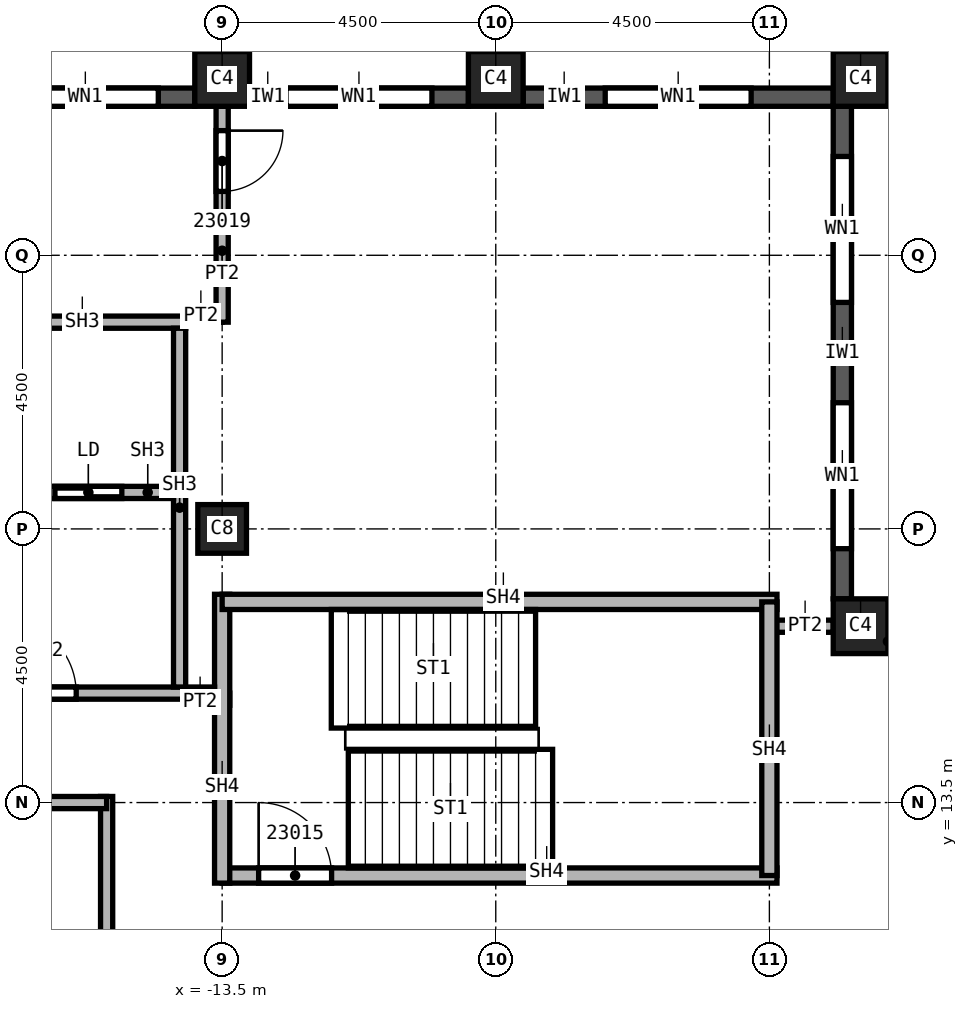
"""IFC4 building model, lengths in metres.
Left out: names, types, materials, properties, quantities, classifications, styles, units other than length and angle.
Written with IfcOpenShell. Run it as: python <this file> out.ifc"""

import sys

from ifc_helpers import new_model, si_unit, direction, frame, frame_2d, origin, origin_2d, place, context, subcontext, project, spatial, rectangle, extrude, element, fill, save


model = new_model("IFC4")
c1 = context("Model", 3, precision=1e-05, world=origin(), true_north=direction((0.0, 1.0)))
c2 = subcontext(c1, "Body", "Model", "MODEL_VIEW")
j1 = project(units=[si_unit("LENGTHUNIT", "METRE"), si_unit("PLANEANGLEUNIT", "RADIAN")], contexts=[c1])
p1 = place(None, origin())
s1 = spatial("IfcSite", under=j1, at=p1, CompositionType="ELEMENT")
p2 = place(p1, origin())
s2 = spatial("IfcBuilding", under=s1, at=p2, CompositionType="ELEMENT")
p3 = place(p2, frame((0.0, 0.0, 330.0)))
s3 = spatial("IfcBuildingStorey", under=s2, at=p3, CompositionType="ELEMENT", Elevation=330.0)
p4 = place(p3, frame((-13.5, 18.0, 0.0), z_axis=(0.0, 0.0, 1.0), x_axis=(1.0, 0.0, 0.0)))
e1 = element("IfcColumn", 1, at=p4, inside=s3, PredefinedType="COLUMN", context=c2, shape_type="SweptSolid", body=[
    extrude(rectangle(XDim=0.8, YDim=0.8, at=origin_2d()), origin(), (0.0, 0.0, 1.0), 3.74),
])
for number, where, z_axis, x_axis in (
    (2, (-3.0, 25.4, 0.0), (0.0, 0.0, 1.0), (1.0, 0.0, 0.0)),
    (3, (-9.0, 25.4, 0.0), (0.0, 0.0, 1.0), (1.0, 0.0, 0.0)),
    (4, (-13.5, 25.4, 0.0), (0.0, 0.0, 1.0), (1.0, 0.0, 0.0)),
    (5, (-3.0, 16.4, 0.0), (0.0, 0.0, 1.0), (1.0, 0.0, 0.0)),
):
    element("IfcColumn", number, at=place(p3, frame(where, z_axis=z_axis, x_axis=x_axis)), inside=s3, PredefinedType="COLUMN", context=c2, shape_type="SweptSolid", body=[
        extrude(rectangle(XDim=0.9, YDim=0.9, at=origin_2d()), origin(), (0.0, 0.0, 1.0), 3.74),
    ])
p5 = place(p3, frame((-3.3, 16.85, 0.0), z_axis=(0.0, 0.0, 1.0), x_axis=(0.0, 1.0, 0.0)))
e6 = element("IfcWall", 6, at=p5, inside=s3, PredefinedType="SOLIDWALL", context=c2, shape_type="SweptSolid", body=[
    extrude(rectangle(XDim=8.1, YDim=0.3, at=frame_2d((4.05, 0.0))), origin(), (0.0, 0.0, 1.0), 3.14),
])
p6 = place(p5, frame((0.825, 0.0, 0.8)))
e7 = element("IfcOpeningElement", 7, at=p6, cuts=e6, PredefinedType="OPENING", context=c2, shape_type="SweptSolid", body=[
    extrude(rectangle(XDim=2.4, YDim=1.95, at=frame_2d((1.2, 0.975))), frame((0.0, 0.15, 0.0), z_axis=(0.0, -1.0, 0.0), x_axis=(1.0, 0.0, 0.0)), (0.0, 0.0, 1.0), 0.3),
])
p7 = place(p5, frame((4.875, 0.0, 0.8)))
e8 = element("IfcOpeningElement", 8, at=p7, cuts=e6, PredefinedType="OPENING", context=c2, shape_type="SweptSolid", body=[
    extrude(rectangle(XDim=2.4, YDim=1.95, at=frame_2d((1.2, 0.975))), frame((0.0, 0.15, 0.0), z_axis=(0.0, -1.0, 0.0), x_axis=(1.0, 0.0, 0.0)), (0.0, 0.0, 1.0), 0.3),
])
p8 = place(p3, frame((-3.45, 25.1, 0.0), z_axis=(0.0, 0.0, 1.0), x_axis=(-1.0, 0.0, 0.0)))
e9 = element("IfcWall", 9, at=p8, inside=s3, PredefinedType="SOLIDWALL", context=c2, shape_type="SweptSolid", body=[
    extrude(rectangle(XDim=5.1, YDim=0.3, at=frame_2d((2.55, 0.0))), origin(), (0.0, 0.0, 1.0), 3.14),
])
p9 = place(p8, frame((1.35, 0.0, 0.8)))
e10 = element("IfcOpeningElement", 10, at=p9, cuts=e9, PredefinedType="OPENING", context=c2, shape_type="SweptSolid", body=[
    extrude(rectangle(XDim=2.4, YDim=1.95, at=frame_2d((1.2, 0.975))), frame((0.0, 0.15, 0.0), z_axis=(0.0, -1.0, 0.0), x_axis=(1.0, 0.0, 0.0)), (0.0, 0.0, 1.0), 0.3),
])
p10 = place(p3, frame((-9.45, 25.1, 0.0), z_axis=(0.0, 0.0, 1.0), x_axis=(-1.0, 0.0, 0.0)))
e11 = element("IfcWall", 11, at=p10, inside=s3, PredefinedType="SOLIDWALL", context=c2, shape_type="SweptSolid", body=[
    extrude(rectangle(XDim=3.6, YDim=0.3, at=frame_2d((1.8, 0.0))), origin(), (0.0, 0.0, 1.0), 3.14),
])
p11 = place(p10, frame((0.6, 0.0, 0.8)))
e12 = element("IfcOpeningElement", 12, at=p11, cuts=e11, PredefinedType="OPENING", context=c2, shape_type="SweptSolid", body=[
    extrude(rectangle(XDim=2.4, YDim=1.95, at=frame_2d((1.2, 0.975))), frame((0.0, 0.15, 0.0), z_axis=(0.0, -1.0, 0.0), x_axis=(1.0, 0.0, 0.0)), (0.0, 0.0, 1.0), 0.3),
])
p12 = place(p3, frame((-13.95, 25.1, 0.0), z_axis=(0.0, 0.0, 1.0), x_axis=(-1.0, 0.0, 0.0)))
e13 = element("IfcWall", 13, at=p12, inside=s3, PredefinedType="SOLIDWALL", context=c2, shape_type="SweptSolid", body=[
    extrude(rectangle(XDim=3.6, YDim=0.3, at=frame_2d((1.8, 0.0))), origin(), (0.0, 0.0, 1.0), 3.14),
])
p13 = place(p12, frame((0.6, 0.0, 0.8)))
e14 = element("IfcOpeningElement", 14, at=p13, cuts=e13, PredefinedType="OPENING", context=c2, shape_type="SweptSolid", body=[
    extrude(rectangle(XDim=2.4, YDim=1.95, at=frame_2d((1.2, 0.975))), frame((0.0, 0.15, 0.0), z_axis=(0.0, -1.0, 0.0), x_axis=(1.0, 0.0, 0.0)), (0.0, 0.0, 1.0), 0.3),
])
p14 = place(p3, frame((-15.4, -24.95, 0.0), z_axis=(0.0, 0.0, 1.0), x_axis=(0.0, 1.0, 0.0)))
e15 = element("IfcWall", 15, at=p14, inside=s3, PredefinedType="PARTITIONING", context=c2, shape_type="SweptSolid", body=[
    extrude(rectangle(XDim=38.55, YDim=0.2, at=frame_2d((19.275, 0.0))), origin(), (0.0, 0.0, 1.0), 3.74),
])
p15 = place(p14, frame((30.8, 0.0, 0.0)))
e16 = element("IfcOpeningElement", 16, at=p15, cuts=e15, PredefinedType="OPENING", context=c2, shape_type="SweptSolid", body=[
    extrude(rectangle(XDim=1.0, YDim=2.1, at=frame_2d((0.5, 1.05))), frame((0.0, 0.1, 0.0), z_axis=(0.0, -1.0, 0.0), x_axis=(1.0, 0.0, 0.0)), (0.0, 0.0, 1.0), 0.2),
])
p16 = place(p14, frame((3.1, 0.0, 0.0)))
e17 = element("IfcOpeningElement", 17, at=p16, cuts=e15, PredefinedType="OPENING", context=c2, shape_type="SweptSolid", body=[
    extrude(rectangle(XDim=1.0, YDim=2.1, at=frame_2d((0.5, 1.05))), frame((0.0, 0.1, 0.0), z_axis=(0.0, -1.0, 0.0), x_axis=(1.0, 0.0, 0.0)), (0.0, 0.0, 1.0), 0.2),
])
p17 = place(p14, frame((10.1, 0.0, 0.0)))
e18 = element("IfcOpeningElement", 18, at=p17, cuts=e15, PredefinedType="OPENING", context=c2, shape_type="SweptSolid", body=[
    extrude(rectangle(XDim=1.0, YDim=2.1, at=frame_2d((0.5, 1.05))), frame((0.0, 0.1, 0.0), z_axis=(0.0, -1.0, 0.0), x_axis=(1.0, 0.0, 0.0)), (0.0, 0.0, 1.0), 0.2),
])
p18 = place(p14, frame((18.2, 0.0, 0.0)))
e19 = element("IfcOpeningElement", 19, at=p18, cuts=e15, PredefinedType="OPENING", context=c2, shape_type="SweptSolid", body=[
    extrude(rectangle(XDim=1.0, YDim=2.1, at=frame_2d((0.5, 1.05))), frame((0.0, 0.1, 0.0), z_axis=(0.0, -1.0, 0.0), x_axis=(1.0, 0.0, 0.0)), (0.0, 0.0, 1.0), 0.2),
])
p19 = place(p3, frame((-15.4, 13.5, 0.0), z_axis=(0.0, 0.0, 1.0), x_axis=(-1.0, 0.0, 0.0)))
e20 = element("IfcWall", 20, at=p19, inside=s3, PredefinedType="PARTITIONING", context=c2, shape_type="SweptSolid", body=[
    extrude(rectangle(XDim=6.6, YDim=0.2, at=frame_2d((3.3, 0.0))), origin(), (0.0, 0.0, 1.0), 3.74),
])
p20 = place(p19, frame((3.7, 0.0, 0.0)))
e21 = element("IfcOpeningElement", 21, at=p20, cuts=e20, PredefinedType="OPENING", context=c2, shape_type="SweptSolid", body=[
    extrude(rectangle(XDim=1.0, YDim=2.1, at=frame_2d((0.5, 1.05))), frame((0.0, 0.1, 0.0), z_axis=(0.0, -1.0, 0.0), x_axis=(1.0, 0.0, 0.0)), (0.0, 0.0, 1.0), 0.2),
])
p21 = place(p3, frame((-14.1, 15.2, 0.0), z_axis=(0.0, 0.0, 1.0), x_axis=(1.0, 0.0, 0.0)))
e22 = element("IfcWall", 22, at=p21, inside=s3, PredefinedType="PARTITIONING", context=c2, shape_type="SweptSolid", body=[
    extrude(rectangle(XDim=0.725, YDim=0.2, at=frame_2d((0.363, 0.0))), origin(), (0.0, 0.0, 1.0), 3.74),
])
p22 = place(p3, frame((-13.5, 21.5, 0.0), z_axis=(0.0, 0.0, 1.0), x_axis=(-1.0, 0.0, 0.0)))
e23 = element("IfcWall", 23, at=p22, inside=s3, PredefinedType="PARTITIONING", context=c2, shape_type="SweptSolid", body=[
    extrude(rectangle(XDim=0.6, YDim=0.2, at=frame_2d((0.3, 0.0))), origin(), (0.0, 0.0, 1.0), 3.74),
])
p23 = place(p3, frame((-13.5, 24.95, 0.0), z_axis=(0.0, 0.0, 1.0), x_axis=(0.0, -1.0, 0.0)))
e24 = element("IfcWall", 24, at=p23, inside=s3, PredefinedType="PARTITIONING", context=c2, shape_type="SweptSolid", body=[
    extrude(rectangle(XDim=3.55, YDim=0.2, at=frame_2d((1.775, 0.0))), origin(), (0.0, 0.0, 1.0), 3.74),
])
p24 = place(p23, frame((0.4, 0.0, 0.0)))
e25 = element("IfcOpeningElement", 25, at=p24, cuts=e24, PredefinedType="OPENING", context=c2, shape_type="SweptSolid", body=[
    extrude(rectangle(XDim=1.0, YDim=2.1, at=frame_2d((0.5, 1.05))), frame((0.0, 0.1, 0.0), z_axis=(0.0, -1.0, 0.0), x_axis=(1.0, 0.0, 0.0)), (0.0, 0.0, 1.0), 0.2),
])
p25 = place(p3, frame((-4.5, 16.4, 0.0), z_axis=(0.0, 0.0, 1.0), x_axis=(1.0, 0.0, 0.0)))
e26 = element("IfcWall", 26, at=p25, inside=s3, PredefinedType="PARTITIONING", context=c2, shape_type="SweptSolid", body=[
    extrude(rectangle(XDim=1.05, YDim=0.2, at=frame_2d((0.525, 0.0))), origin(), (0.0, 0.0, 1.0), 3.74),
])
p26 = place(p3, frame((-13.5, 12.3, 0.0), z_axis=(0.0, 0.0, 1.0), x_axis=(1.0, 0.0, 0.0)))
e27 = element("IfcWall", 27, at=p26, inside=s3, PredefinedType="SOLIDWALL", context=c2, shape_type="SweptSolid", body=[
    extrude(rectangle(XDim=9.125, YDim=0.25, at=frame_2d((4.562, 0.0))), origin(), (0.0, 0.0, 1.0), 3.74),
])
p27 = place(p26, frame((0.6, 0.0, 0.0)))
e28 = element("IfcOpeningElement", 28, at=p27, cuts=e27, PredefinedType="OPENING", context=c2, shape_type="SweptSolid", body=[
    extrude(rectangle(XDim=1.2, YDim=2.1, at=frame_2d((0.6, 1.05))), frame((0.0, 0.125, 0.0), z_axis=(0.0, -1.0, 0.0), x_axis=(1.0, 0.0, 0.0)), (0.0, 0.0, 1.0), 0.25),
])
p28 = place(p3, frame((-13.5, 12.175, 0.0), z_axis=(0.0, 0.0, 1.0), x_axis=(0.0, 1.0, 0.0)))
e29 = element("IfcWall", 29, at=p28, inside=s3, PredefinedType="SOLIDWALL", context=c2, shape_type="SweptSolid", body=[
    extrude(rectangle(XDim=4.75, YDim=0.25, at=frame_2d((2.375, 0.0))), origin(), (0.0, 0.0, 1.0), 3.74),
])
p29 = place(p3, frame((-13.5, 16.8, 0.0), z_axis=(0.0, 0.0, 1.0), x_axis=(1.0, 0.0, 0.0)))
e30 = element("IfcWall", 30, at=p29, inside=s3, PredefinedType="SOLIDWALL", context=c2, shape_type="SweptSolid", body=[
    extrude(rectangle(XDim=9.125, YDim=0.25, at=frame_2d((4.562, 0.0))), origin(), (0.0, 0.0, 1.0), 3.74),
])
p30 = place(p3, frame((-4.5, 16.8, 0.0), z_axis=(0.0, 0.0, 1.0), x_axis=(0.0, -1.0, 0.0)))
e31 = element("IfcWall", 31, at=p30, inside=s3, PredefinedType="SOLIDWALL", context=c2, shape_type="SweptSolid", body=[
    extrude(rectangle(XDim=4.5, YDim=0.25, at=frame_2d((2.25, 0.0))), origin(), (0.0, 0.0, 1.0), 3.74),
])
p31 = place(p3, frame((-21.9, 15.3, 0.0), z_axis=(0.0, 0.0, 1.0), x_axis=(1.0, 0.0, 0.0)))
e32 = element("IfcWall", 32, at=p31, inside=s3, PredefinedType="SOLIDWALL", context=c2, shape_type="SweptSolid", body=[
    extrude(rectangle(XDim=8.275, YDim=0.2, at=frame_2d((4.137, 0.0))), origin(), (0.0, 0.0, 1.0), 3.74),
])
p32 = place(p31, frame((4.8, 0.0, 0.0)))
e33 = element("IfcOpeningElement", 33, at=p32, cuts=e32, PredefinedType="OPENING", context=c2, shape_type="SweptSolid", body=[
    extrude(rectangle(XDim=1.2, YDim=2.1, at=frame_2d((0.6, 1.05))), frame((0.0, 0.1, 0.0), z_axis=(0.0, -1.0, 0.0), x_axis=(1.0, 0.0, 0.0)), (0.0, 0.0, 1.0), 0.2),
])
p33 = place(p3, frame((-21.9, 21.4, 0.0), z_axis=(0.0, 0.0, 1.0), x_axis=(1.0, 0.0, 0.0)))
e34 = element("IfcWall", 34, at=p33, inside=s3, PredefinedType="SOLIDWALL", context=c2, shape_type="SweptSolid", body=[
    extrude(rectangle(XDim=7.8, YDim=0.2, at=frame_2d((3.9, 0.0))), origin(), (0.0, 0.0, 1.0), 3.74),
])
p34 = place(p33, frame((3.2, 0.0, 0.0)))
e35 = element("IfcOpeningElement", 35, at=p34, cuts=e34, PredefinedType="OPENING", context=c2, shape_type="SweptSolid", body=[
    extrude(rectangle(XDim=1.2, YDim=2.1, at=frame_2d((0.6, 1.05))), frame((0.0, 0.1, 0.0), z_axis=(0.0, -1.0, 0.0), x_axis=(1.0, 0.0, 0.0)), (0.0, 0.0, 1.0), 0.2),
])
p35 = place(p3, frame((-14.2, 15.4, 0.0), z_axis=(0.0, 0.0, 1.0), x_axis=(0.0, 1.0, 0.0)))
e36 = element("IfcWall", 36, at=p35, inside=s3, PredefinedType="SOLIDWALL", context=c2, shape_type="SweptSolid", body=[
    extrude(rectangle(XDim=5.9, YDim=0.2, at=frame_2d((2.95, 0.0))), origin(), (0.0, 0.0, 1.0), 3.74),
])
p36 = place(p3, frame((-17.1, 18.6, 0.0), z_axis=(0.0, 0.0, 1.0), x_axis=(1.0, 0.0, 0.0)))
e37 = element("IfcWall", 37, at=p36, inside=s3, PredefinedType="SOLIDWALL", context=c2, shape_type="SweptSolid", body=[
    extrude(rectangle(XDim=2.8, YDim=0.2, at=frame_2d((1.4, 0.0))), origin(), (0.0, 0.0, 1.0), 3.74),
])
p37 = place(p36, frame((0.85, 0.0, 0.0)))
e38 = element("IfcOpeningElement", 38, at=p37, cuts=e37, PredefinedType="OPENING", context=c2, shape_type="SweptSolid", body=[
    extrude(rectangle(XDim=1.1, YDim=2.1, at=frame_2d((0.55, 1.05))), frame((0.0, 0.1, 0.0), z_axis=(0.0, -1.0, 0.0), x_axis=(1.0, 0.0, 0.0)), (0.0, 0.0, 1.0), 0.2),
])
p38 = place(p6, origin())
e39 = element("IfcWindow", 39, at=p38, inside=s3, PartitioningType="SINGLE_PANEL", PredefinedType="WINDOW", context=c2, shape_type="SweptSolid", body=[
    extrude(rectangle(XDim=2.4, YDim=1.95, at=frame_2d((1.2, 0.975))), frame((0.0, 0.03, 0.0), z_axis=(0.0, -1.0, 0.0), x_axis=(1.0, 0.0, 0.0)), (0.0, 0.0, 1.0), 0.06),
])
fill(e7, e39)
p39 = place(p7, origin())
e40 = element("IfcWindow", 40, at=p39, inside=s3, PartitioningType="SINGLE_PANEL", PredefinedType="WINDOW", context=c2, shape_type="SweptSolid", body=[
    extrude(rectangle(XDim=2.4, YDim=1.95, at=frame_2d((1.2, 0.975))), frame((0.0, 0.03, 0.0), z_axis=(0.0, -1.0, 0.0), x_axis=(1.0, 0.0, 0.0)), (0.0, 0.0, 1.0), 0.06),
])
fill(e8, e40)
p40 = place(p9, origin())
e41 = element("IfcWindow", 41, at=p40, inside=s3, PartitioningType="SINGLE_PANEL", PredefinedType="WINDOW", context=c2, shape_type="SweptSolid", body=[
    extrude(rectangle(XDim=2.4, YDim=1.95, at=frame_2d((1.2, 0.975))), frame((0.0, 0.03, 0.0), z_axis=(0.0, -1.0, 0.0), x_axis=(1.0, 0.0, 0.0)), (0.0, 0.0, 1.0), 0.06),
])
fill(e10, e41)
p41 = place(p11, origin())
e42 = element("IfcWindow", 42, at=p41, inside=s3, PartitioningType="SINGLE_PANEL", PredefinedType="WINDOW", context=c2, shape_type="SweptSolid", body=[
    extrude(rectangle(XDim=2.4, YDim=1.95, at=frame_2d((1.2, 0.975))), frame((0.0, 0.03, 0.0), z_axis=(0.0, -1.0, 0.0), x_axis=(1.0, 0.0, 0.0)), (0.0, 0.0, 1.0), 0.06),
])
fill(e12, e42)
p42 = place(p13, origin())
e43 = element("IfcWindow", 43, at=p42, inside=s3, PartitioningType="SINGLE_PANEL", PredefinedType="WINDOW", context=c2, shape_type="SweptSolid", body=[
    extrude(rectangle(XDim=2.4, YDim=1.95, at=frame_2d((1.2, 0.975))), frame((0.0, 0.03, 0.0), z_axis=(0.0, -1.0, 0.0), x_axis=(1.0, 0.0, 0.0)), (0.0, 0.0, 1.0), 0.06),
])
fill(e14, e43)
p43 = place(p27, origin())
e44 = element("IfcDoor", 44, at=p43, inside=s3, OperationType="SINGLE_SWING_RIGHT", PredefinedType="DOOR", context=c2, shape_type="SweptSolid", body=[
    extrude(rectangle(XDim=1.2, YDim=2.1, at=frame_2d((0.6, 1.05))), frame((0.0, 0.025, 0.0), z_axis=(0.0, -1.0, 0.0), x_axis=(1.0, 0.0, 0.0)), (0.0, 0.0, 1.0), 0.05),
])
fill(e28, e44)
p44 = place(p24, origin())
e45 = element("IfcDoor", 45, at=p44, inside=s3, OperationType="SINGLE_SWING_RIGHT", PredefinedType="DOOR", context=c2, shape_type="SweptSolid", body=[
    extrude(rectangle(XDim=1.0, YDim=2.1, at=frame_2d((0.5, 1.05))), frame((0.0, 0.025, 0.0), z_axis=(0.0, -1.0, 0.0), x_axis=(1.0, 0.0, 0.0)), (0.0, 0.0, 1.0), 0.05),
])
fill(e25, e45)
p45 = place(p37, origin())
e46 = element("IfcDoor", 46, at=p45, inside=s3, OperationType="SLIDING_TO_LEFT", PredefinedType="DOOR", context=c2, shape_type="SweptSolid", body=[
    extrude(rectangle(XDim=1.1, YDim=2.1, at=frame_2d((0.55, 1.05))), frame((0.0, 0.025, 0.0), z_axis=(0.0, -1.0, 0.0), x_axis=(1.0, 0.0, 0.0)), (0.0, 0.0, 1.0), 0.05),
])
fill(e38, e46)
p46 = place(p32, origin())
e47 = element("IfcDoor", 47, at=p46, inside=s3, OperationType="SINGLE_SWING_RIGHT", PredefinedType="DOOR", context=c2, shape_type="SweptSolid", body=[
    extrude(rectangle(XDim=1.2, YDim=2.1, at=frame_2d((0.6, 1.05))), frame((0.0, 0.025, 0.0), z_axis=(0.0, -1.0, 0.0), x_axis=(1.0, 0.0, 0.0)), (0.0, 0.0, 1.0), 0.05),
])
fill(e33, e47)
save(model, sys.argv[1])
